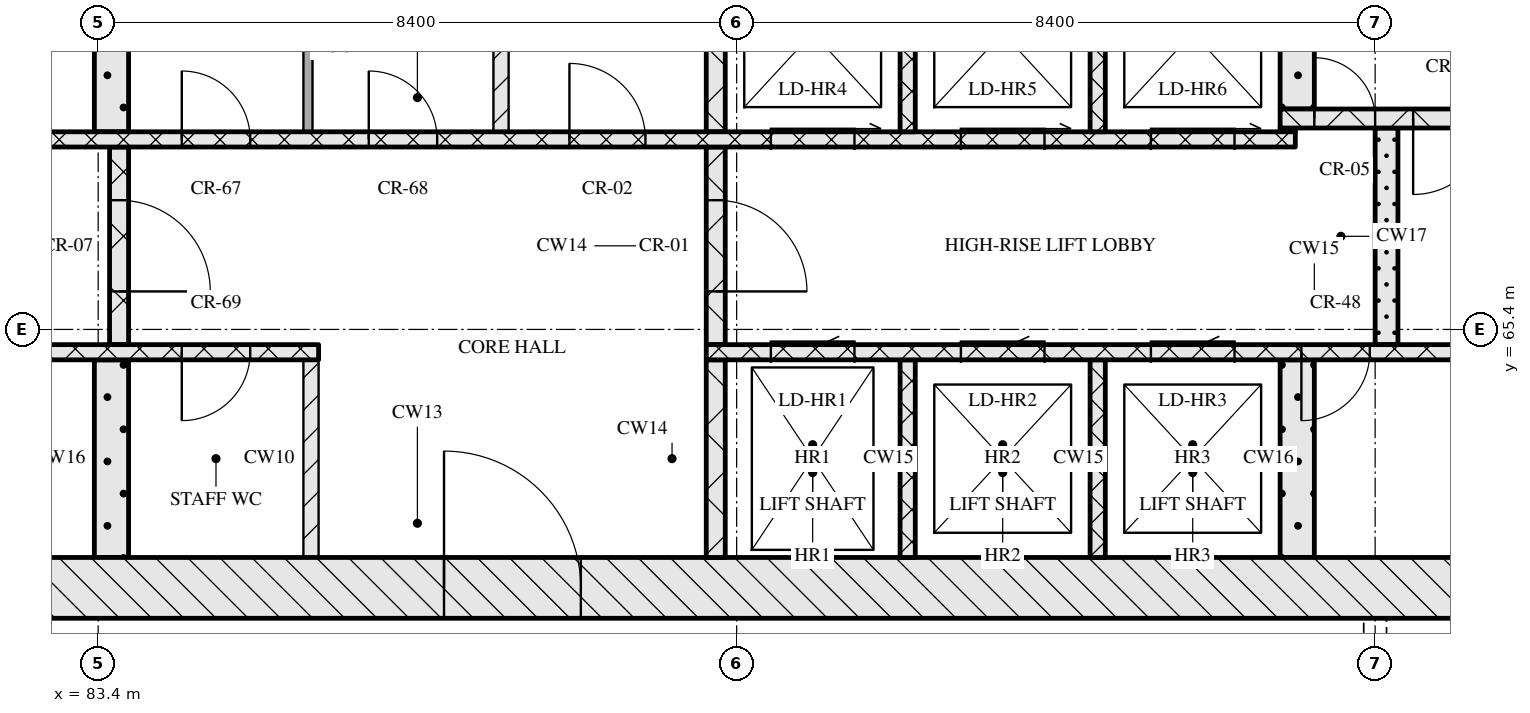
"""IFC4 building model, lengths in metres.
Left out: names, types, materials, properties, quantities, classifications, styles, units other than length and angle.
Written with IfcOpenShell. Run it as: python <this file> out.ifc"""

import sys

from ifc_helpers import new_model, si_unit, direction, frame, frame_2d, origin, place, context, subcontext, project, spatial, rectangle, extrude, element, fill, save


model = new_model("IFC4")
c1 = context("Model", 3, precision=1e-05, world=origin(), true_north=direction((0.0, 1.0)))
c2 = subcontext(c1, "Body", "Model", "MODEL_VIEW")
j1 = project(units=[si_unit("LENGTHUNIT", "METRE"), si_unit("PLANEANGLEUNIT", "RADIAN")], contexts=[c1])
p1 = place(None, origin())
s1 = spatial("IfcSite", under=j1, at=p1, CompositionType="ELEMENT")
p2 = place(p1, origin())
s2 = spatial("IfcBuilding", under=s1, at=p2, CompositionType="ELEMENT")
p3 = place(p2, frame((0.0, 0.0, 176.25)))
s3 = spatial("IfcBuildingStorey", under=s2, at=p3, CompositionType="ELEMENT", Elevation=176.25)
p4 = place(p3, frame((67.0, 62.0, 0.0), z_axis=(0.0, 0.0, 1.0), x_axis=(1.0, 0.0, 0.0)))
e1 = element("IfcWall", 1, at=p4, inside=s3, PredefinedType="SOLIDWALL", context=c2, shape_type="SweptSolid", body=[
    extrude(rectangle(XDim=41.2, YDim=0.8, at=frame_2d((20.6, 0.0))), origin(), (0.0, 0.0, 1.0), 3.32),
])
p5 = place(p4, frame((20.95, 0.0, 0.0)))
e2 = element("IfcOpeningElement", 2, at=p5, cuts=e1, PredefinedType="OPENING", context=c2, shape_type="SweptSolid", body=[
    extrude(rectangle(XDim=1.8, YDim=2.1, at=frame_2d((0.9, 1.05))), frame((0.0, 0.41, 0.0), z_axis=(0.0, -1.0, 0.0), x_axis=(1.0, 0.0, 0.0)), (0.0, 0.0, 1.0), 0.82),
])
p6 = place(p3, frame((83.575, 62.4, 0.0), z_axis=(0.0, 0.0, 1.0), x_axis=(0.0, 1.0, 0.0)))
e3 = element("IfcWall", 3, at=p6, inside=s3, PredefinedType="SOLIDWALL", context=c2, shape_type="SweptSolid", body=[
    extrude(rectangle(XDim=2.6, YDim=0.45, at=frame_2d((1.3, 0.0))), origin(), (0.0, 0.0, 1.0), 3.32),
])
p7 = place(p3, frame((86.2, 62.4, 0.0), z_axis=(0.0, 0.0, 1.0), x_axis=(0.0, 1.0, 0.0)))
e4 = element("IfcWall", 4, at=p7, inside=s3, PredefinedType="PARTITIONING", context=c2, shape_type="SweptSolid", body=[
    extrude(rectangle(XDim=2.6, YDim=0.2, at=frame_2d((1.3, 0.0))), origin(), (0.0, 0.0, 1.0), 3.32),
])
p8 = place(p3, frame((91.525, 62.4, 0.0), z_axis=(0.0, 0.0, 1.0), x_axis=(0.0, 1.0, 0.0)))
e5 = element("IfcWall", 5, at=p8, inside=s3, PredefinedType="SOLIDWALL", context=c2, shape_type="SweptSolid", body=[
    extrude(rectangle(XDim=2.6, YDim=0.25, at=frame_2d((1.3, 0.0))), origin(), (0.0, 0.0, 1.0), 3.32),
])
for number, where, z_axis, x_axis in (
    (6, (94.05, 62.4, 0.0), (0.0, 0.0, 1.0), (0.0, 1.0, 0.0)),
    (7, (96.55, 62.4, 0.0), (0.0, 0.0, 1.0), (0.0, 1.0, 0.0)),
):
    element("IfcWall", number, at=place(p3, frame(where, z_axis=z_axis, x_axis=x_axis)), inside=s3, PredefinedType="SOLIDWALL", context=c2, shape_type="SweptSolid", body=[
        extrude(rectangle(XDim=2.6, YDim=0.2, at=frame_2d((1.3, 0.0))), origin(), (0.0, 0.0, 1.0), 3.32),
    ])
p9 = place(p3, frame((99.175, 62.4, 0.0), z_axis=(0.0, 0.0, 1.0), x_axis=(0.0, 1.0, 0.0)))
e8 = element("IfcWall", 8, at=p9, inside=s3, PredefinedType="SOLIDWALL", context=c2, shape_type="SweptSolid", body=[
    extrude(rectangle(XDim=2.6, YDim=0.45, at=frame_2d((1.3, 0.0))), origin(), (0.0, 0.0, 1.0), 3.32),
])
p10 = place(p3, frame((67.8, 65.1, 0.0), z_axis=(0.0, 0.0, 1.0), x_axis=(1.0, 0.0, 0.0)))
e9 = element("IfcWall", 9, at=p10, inside=s3, PredefinedType="SOLIDWALL", context=c2, shape_type="SweptSolid", body=[
    extrude(rectangle(XDim=18.5, YDim=0.2, at=frame_2d((9.25, 0.0))), origin(), (0.0, 0.0, 1.0), 3.32),
])
p11 = place(p10, frame((7.27, 0.0, 0.0)))
e10 = element("IfcOpeningElement", 10, at=p11, cuts=e9, PredefinedType="OPENING", context=c2, shape_type="SweptSolid", body=[
    extrude(rectangle(XDim=0.9, YDim=2.1, at=frame_2d((0.45, 1.05))), frame((0.0, 0.11, 0.0), z_axis=(0.0, -1.0, 0.0), x_axis=(1.0, 0.0, 0.0)), (0.0, 0.0, 1.0), 0.22),
])
p12 = place(p10, frame((9.05, 0.0, 0.0)))
e11 = element("IfcOpeningElement", 11, at=p12, cuts=e9, PredefinedType="OPENING", context=c2, shape_type="SweptSolid", body=[
    extrude(rectangle(XDim=0.9, YDim=2.1, at=frame_2d((0.45, 1.05))), frame((0.0, 0.11, 0.0), z_axis=(0.0, -1.0, 0.0), x_axis=(1.0, 0.0, 0.0)), (0.0, 0.0, 1.0), 0.22),
])
p13 = place(p10, frame((12.76, 0.0, 0.0)))
e12 = element("IfcOpeningElement", 12, at=p13, cuts=e9, PredefinedType="OPENING", context=c2, shape_type="SweptSolid", body=[
    extrude(rectangle(XDim=0.9, YDim=2.1, at=frame_2d((0.45, 1.05))), frame((0.0, 0.11, 0.0), z_axis=(0.0, -1.0, 0.0), x_axis=(1.0, 0.0, 0.0)), (0.0, 0.0, 1.0), 0.22),
])
p14 = place(p10, frame((16.7, 0.0, 0.0)))
e13 = element("IfcOpeningElement", 13, at=p14, cuts=e9, PredefinedType="OPENING", context=c2, shape_type="SweptSolid", body=[
    extrude(rectangle(XDim=0.9, YDim=2.1, at=frame_2d((0.45, 1.05))), frame((0.0, 0.11, 0.0), z_axis=(0.0, -1.0, 0.0), x_axis=(1.0, 0.0, 0.0)), (0.0, 0.0, 1.0), 0.22),
])
p15 = place(p3, frame((91.4, 65.1, 0.0), z_axis=(0.0, 0.0, 1.0), x_axis=(1.0, 0.0, 0.0)))
e14 = element("IfcWall", 14, at=p15, inside=s3, PredefinedType="SOLIDWALL", context=c2, shape_type="SweptSolid", body=[
    extrude(rectangle(XDim=16.0, YDim=0.2, at=frame_2d((8.0, 0.0))), origin(), (0.0, 0.0, 1.0), 3.32),
])
p16 = place(p15, frame((0.85, 0.0, 0.0)))
e15 = element("IfcOpeningElement", 15, at=p16, cuts=e14, PredefinedType="OPENING", context=c2, shape_type="SweptSolid", body=[
    extrude(rectangle(XDim=1.1, YDim=2.1, at=frame_2d((0.55, 1.05))), frame((0.0, 0.11, 0.0), z_axis=(0.0, -1.0, 0.0), x_axis=(1.0, 0.0, 0.0)), (0.0, 0.0, 1.0), 0.22),
])
p17 = place(p15, frame((3.35, 0.0, 0.0)))
e16 = element("IfcOpeningElement", 16, at=p17, cuts=e14, PredefinedType="OPENING", context=c2, shape_type="SweptSolid", body=[
    extrude(rectangle(XDim=1.1, YDim=2.1, at=frame_2d((0.55, 1.05))), frame((0.0, 0.11, 0.0), z_axis=(0.0, -1.0, 0.0), x_axis=(1.0, 0.0, 0.0)), (0.0, 0.0, 1.0), 0.22),
])
p18 = place(p15, frame((5.85, 0.0, 0.0)))
e17 = element("IfcOpeningElement", 17, at=p18, cuts=e14, PredefinedType="OPENING", context=c2, shape_type="SweptSolid", body=[
    extrude(rectangle(XDim=1.1, YDim=2.1, at=frame_2d((0.55, 1.05))), frame((0.0, 0.11, 0.0), z_axis=(0.0, -1.0, 0.0), x_axis=(1.0, 0.0, 0.0)), (0.0, 0.0, 1.0), 0.22),
])
p19 = place(p15, frame((7.83, 0.0, 0.0)))
e18 = element("IfcOpeningElement", 18, at=p19, cuts=e14, PredefinedType="OPENING", context=c2, shape_type="SweptSolid", body=[
    extrude(rectangle(XDim=0.9, YDim=2.1, at=frame_2d((0.45, 1.05))), frame((0.0, 0.11, 0.0), z_axis=(0.0, -1.0, 0.0), x_axis=(1.0, 0.0, 0.0)), (0.0, 0.0, 1.0), 0.22),
])
p20 = place(p3, frame((83.675, 65.2, 0.0), z_axis=(0.0, 0.0, 1.0), x_axis=(0.0, 1.0, 0.0)))
e19 = element("IfcWall", 19, at=p20, inside=s3, PredefinedType="SOLIDWALL", context=c2, shape_type="SweptSolid", body=[
    extrude(rectangle(XDim=2.6, YDim=0.25, at=frame_2d((1.3, 0.0))), origin(), (0.0, 0.0, 1.0), 3.32),
])
p21 = place(p20, frame((0.7, 0.0, 0.0)))
e20 = element("IfcOpeningElement", 20, at=p21, cuts=e19, PredefinedType="OPENING", context=c2, shape_type="SweptSolid", body=[
    extrude(rectangle(XDim=1.2, YDim=2.1, at=frame_2d((0.6, 1.05))), frame((0.0, 0.135, 0.0), z_axis=(0.0, -1.0, 0.0), x_axis=(1.0, 0.0, 0.0)), (0.0, 0.0, 1.0), 0.27),
])
p22 = place(p3, frame((91.525, 65.2, 0.0), z_axis=(0.0, 0.0, 1.0), x_axis=(0.0, 1.0, 0.0)))
e21 = element("IfcWall", 21, at=p22, inside=s3, PredefinedType="SOLIDWALL", context=c2, shape_type="SweptSolid", body=[
    extrude(rectangle(XDim=2.6, YDim=0.25, at=frame_2d((1.3, 0.0))), origin(), (0.0, 0.0, 1.0), 3.32),
])
p23 = place(p22, frame((0.7, 0.0, 0.0)))
e22 = element("IfcOpeningElement", 22, at=p23, cuts=e21, PredefinedType="OPENING", context=c2, shape_type="SweptSolid", body=[
    extrude(rectangle(XDim=1.2, YDim=2.1, at=frame_2d((0.6, 1.05))), frame((0.0, 0.135, 0.0), z_axis=(0.0, -1.0, 0.0), x_axis=(1.0, 0.0, 0.0)), (0.0, 0.0, 1.0), 0.27),
])
p24 = place(p3, frame((100.35, 65.2, 0.0), z_axis=(0.0, 0.0, 1.0), x_axis=(0.0, 1.0, 0.0)))
e23 = element("IfcWall", 23, at=p24, inside=s3, PredefinedType="SOLIDWALL", context=c2, shape_type="SweptSolid", body=[
    extrude(rectangle(XDim=2.85, YDim=0.3, at=frame_2d((1.425, 0.0))), origin(), (0.0, 0.0, 1.0), 3.32),
])
p25 = place(p3, frame((76.05, 67.9, 0.0), z_axis=(0.0, 0.0, 1.0), x_axis=(1.0, 0.0, 0.0)))
e24 = element("IfcWall", 24, at=p25, inside=s3, PredefinedType="SOLIDWALL", context=c2, shape_type="SweptSolid", body=[
    extrude(rectangle(XDim=23.1, YDim=0.2, at=frame_2d((11.55, 0.0))), origin(), (0.0, 0.0, 1.0), 3.32),
])
p26 = place(p25, frame((1.35, 0.0, 0.0)))
e25 = element("IfcOpeningElement", 25, at=p26, cuts=e24, PredefinedType="OPENING", context=c2, shape_type="SweptSolid", body=[
    extrude(rectangle(XDim=0.9, YDim=2.1, at=frame_2d((0.45, 1.05))), frame((0.0, 0.11, 0.0), z_axis=(0.0, -1.0, 0.0), x_axis=(1.0, 0.0, 0.0)), (0.0, 0.0, 1.0), 0.22),
])
p27 = place(p25, frame((5.06, 0.0, 0.0)))
e26 = element("IfcOpeningElement", 26, at=p27, cuts=e24, PredefinedType="OPENING", context=c2, shape_type="SweptSolid", body=[
    extrude(rectangle(XDim=0.9, YDim=2.1, at=frame_2d((0.45, 1.05))), frame((0.0, 0.11, 0.0), z_axis=(0.0, -1.0, 0.0), x_axis=(1.0, 0.0, 0.0)), (0.0, 0.0, 1.0), 0.22),
])
p28 = place(p25, frame((8.45, 0.0, 0.0)))
e27 = element("IfcOpeningElement", 27, at=p28, cuts=e24, PredefinedType="OPENING", context=c2, shape_type="SweptSolid", body=[
    extrude(rectangle(XDim=0.9, YDim=2.1, at=frame_2d((0.45, 1.05))), frame((0.0, 0.11, 0.0), z_axis=(0.0, -1.0, 0.0), x_axis=(1.0, 0.0, 0.0)), (0.0, 0.0, 1.0), 0.22),
])
p29 = place(p25, frame((10.91, 0.0, 0.0)))
e28 = element("IfcOpeningElement", 28, at=p29, cuts=e24, PredefinedType="OPENING", context=c2, shape_type="SweptSolid", body=[
    extrude(rectangle(XDim=0.9, YDim=2.1, at=frame_2d((0.45, 1.05))), frame((0.0, 0.11, 0.0), z_axis=(0.0, -1.0, 0.0), x_axis=(1.0, 0.0, 0.0)), (0.0, 0.0, 1.0), 0.22),
])
p30 = place(p25, frame((13.55, 0.0, 0.0)))
e29 = element("IfcOpeningElement", 29, at=p30, cuts=e24, PredefinedType="OPENING", context=c2, shape_type="SweptSolid", body=[
    extrude(rectangle(XDim=1.0, YDim=2.1, at=frame_2d((0.5, 1.05))), frame((0.0, 0.11, 0.0), z_axis=(0.0, -1.0, 0.0), x_axis=(1.0, 0.0, 0.0)), (0.0, 0.0, 1.0), 0.22),
])
p31 = place(p25, frame((16.2, 0.0, 0.0)))
e30 = element("IfcOpeningElement", 30, at=p31, cuts=e24, PredefinedType="OPENING", context=c2, shape_type="SweptSolid", body=[
    extrude(rectangle(XDim=1.1, YDim=2.1, at=frame_2d((0.55, 1.05))), frame((0.0, 0.11, 0.0), z_axis=(0.0, -1.0, 0.0), x_axis=(1.0, 0.0, 0.0)), (0.0, 0.0, 1.0), 0.22),
])
p32 = place(p25, frame((18.7, 0.0, 0.0)))
e31 = element("IfcOpeningElement", 31, at=p32, cuts=e24, PredefinedType="OPENING", context=c2, shape_type="SweptSolid", body=[
    extrude(rectangle(XDim=1.1, YDim=2.1, at=frame_2d((0.55, 1.05))), frame((0.0, 0.11, 0.0), z_axis=(0.0, -1.0, 0.0), x_axis=(1.0, 0.0, 0.0)), (0.0, 0.0, 1.0), 0.22),
])
p33 = place(p25, frame((21.2, 0.0, 0.0)))
e32 = element("IfcOpeningElement", 32, at=p33, cuts=e24, PredefinedType="OPENING", context=c2, shape_type="SweptSolid", body=[
    extrude(rectangle(XDim=1.1, YDim=2.1, at=frame_2d((0.55, 1.05))), frame((0.0, 0.11, 0.0), z_axis=(0.0, -1.0, 0.0), x_axis=(1.0, 0.0, 0.0)), (0.0, 0.0, 1.0), 0.22),
])
p34 = place(p3, frame((83.575, 68.0, 0.0), z_axis=(0.0, 0.0, 1.0), x_axis=(0.0, 1.0, 0.0)))
e33 = element("IfcWall", 33, at=p34, inside=s3, PredefinedType="SOLIDWALL", context=c2, shape_type="SweptSolid", body=[
    extrude(rectangle(XDim=2.6, YDim=0.45, at=frame_2d((1.3, 0.0))), origin(), (0.0, 0.0, 1.0), 3.32),
])
p35 = place(p3, frame((86.16, 68.0, 0.0), z_axis=(0.0, 0.0, 1.0), x_axis=(0.0, 1.0, 0.0)))
e34 = element("IfcWall", 34, at=p35, inside=s3, PredefinedType="PARTITIONING", context=c2, shape_type="SweptSolid", body=[
    extrude(rectangle(XDim=2.6, YDim=0.12, at=frame_2d((1.3, 0.0))), origin(), (0.0, 0.0, 1.0), 3.32),
])
p36 = place(p3, frame((88.7, 68.0, 0.0), z_axis=(0.0, 0.0, 1.0), x_axis=(0.0, 1.0, 0.0)))
e35 = element("IfcWall", 35, at=p36, inside=s3, PredefinedType="PARTITIONING", context=c2, shape_type="SweptSolid", body=[
    extrude(rectangle(XDim=2.6, YDim=0.2, at=frame_2d((1.3, 0.0))), origin(), (0.0, 0.0, 1.0), 3.32),
])
p37 = place(p3, frame((91.525, 68.0, 0.0), z_axis=(0.0, 0.0, 1.0), x_axis=(0.0, 1.0, 0.0)))
e36 = element("IfcWall", 36, at=p37, inside=s3, PredefinedType="SOLIDWALL", context=c2, shape_type="SweptSolid", body=[
    extrude(rectangle(XDim=2.6, YDim=0.25, at=frame_2d((1.3, 0.0))), origin(), (0.0, 0.0, 1.0), 3.32),
])
for number, where, z_axis, x_axis in (
    (37, (94.05, 68.0, 0.0), (0.0, 0.0, 1.0), (0.0, 1.0, 0.0)),
    (38, (96.55, 68.0, 0.0), (0.0, 0.0, 1.0), (0.0, 1.0, 0.0)),
):
    element("IfcWall", number, at=place(p3, frame(where, z_axis=z_axis, x_axis=x_axis)), inside=s3, PredefinedType="SOLIDWALL", context=c2, shape_type="SweptSolid", body=[
        extrude(rectangle(XDim=2.6, YDim=0.2, at=frame_2d((1.3, 0.0))), origin(), (0.0, 0.0, 1.0), 3.32),
    ])
p38 = place(p3, frame((98.95, 68.025, 0.0), z_axis=(0.0, 0.0, 1.0), x_axis=(1.0, 0.0, 0.0)))
e39 = element("IfcWall", 39, at=p38, inside=s3, PredefinedType="SOLIDWALL", context=c2, shape_type="SweptSolid", body=[
    extrude(rectangle(XDim=0.2, YDim=0.05, at=frame_2d((0.1, 0.0))), origin(), (0.0, 0.0, 1.0), 3.32),
])
p39 = place(p3, frame((98.95, 68.175, 0.0), z_axis=(0.0, 0.0, 1.0), x_axis=(1.0, 0.0, 0.0)))
e40 = element("IfcWall", 40, at=p39, inside=s3, PredefinedType="SOLIDWALL", context=c2, shape_type="SweptSolid", body=[
    extrude(rectangle(XDim=8.45, YDim=0.25, at=frame_2d((4.225, 0.0))), origin(), (0.0, 0.0, 1.0), 3.32),
])
p40 = place(p39, frame((0.45, 0.0, 0.0)))
e41 = element("IfcOpeningElement", 41, at=p40, cuts=e40, PredefinedType="OPENING", context=c2, shape_type="SweptSolid", body=[
    extrude(rectangle(XDim=0.8, YDim=2.1, at=frame_2d((0.4, 1.05))), frame((0.0, 0.135, 0.0), z_axis=(0.0, -1.0, 0.0), x_axis=(1.0, 0.0, 0.0)), (0.0, 0.0, 1.0), 0.27),
])
p41 = place(p39, frame((1.75, 0.0, 0.0)))
e42 = element("IfcOpeningElement", 42, at=p41, cuts=e40, PredefinedType="OPENING", context=c2, shape_type="SweptSolid", body=[
    extrude(rectangle(XDim=1.0, YDim=2.1, at=frame_2d((0.5, 1.05))), frame((0.0, 0.135, 0.0), z_axis=(0.0, -1.0, 0.0), x_axis=(1.0, 0.0, 0.0)), (0.0, 0.0, 1.0), 0.27),
])
p42 = place(p3, frame((99.175, 68.3, 0.0), z_axis=(0.0, 0.0, 1.0), x_axis=(0.0, 1.0, 0.0)))
e43 = element("IfcWall", 43, at=p42, inside=s3, PredefinedType="SOLIDWALL", context=c2, shape_type="SweptSolid", body=[
    extrude(rectangle(XDim=2.3, YDim=0.45, at=frame_2d((1.15, 0.0))), origin(), (0.0, 0.0, 1.0), 3.32),
])
p43 = place(p5, origin())
e44 = element("IfcDoor", 44, at=p43, inside=s3, OperationType="DOUBLE_DOOR_SINGLE_SWING", PredefinedType="DOOR", context=c2, shape_type="SweptSolid", body=[
    extrude(rectangle(XDim=1.8, YDim=2.1, at=frame_2d((0.9, 1.05))), frame((0.0, 0.025, 0.0), z_axis=(0.0, -1.0, 0.0), x_axis=(1.0, 0.0, 0.0)), (0.0, 0.0, 1.0), 0.05),
])
fill(e2, e44)
p44 = place(p14, origin())
e45 = element("IfcDoor", 45, at=p44, inside=s3, OperationType="SINGLE_SWING_RIGHT", PredefinedType="DOOR", context=c2, shape_type="SweptSolid", body=[
    extrude(rectangle(XDim=0.9, YDim=2.1, at=frame_2d((0.45, 1.05))), frame((0.0, 0.025, 0.0), z_axis=(0.0, -1.0, 0.0), x_axis=(1.0, 0.0, 0.0)), (0.0, 0.0, 1.0), 0.05),
])
fill(e13, e45)
p45 = place(p16, origin())
e46 = element("IfcDoor", 46, at=p45, inside=s3, OperationType="SLIDING_TO_LEFT", PredefinedType="DOOR", context=c2, shape_type="SweptSolid", body=[
    extrude(rectangle(XDim=1.1, YDim=2.1, at=frame_2d((0.55, 1.05))), frame((0.0, 0.025, 0.0), z_axis=(0.0, -1.0, 0.0), x_axis=(1.0, 0.0, 0.0)), (0.0, 0.0, 1.0), 0.05),
])
fill(e15, e46)
p46 = place(p17, origin())
e47 = element("IfcDoor", 47, at=p46, inside=s3, OperationType="SLIDING_TO_LEFT", PredefinedType="DOOR", context=c2, shape_type="SweptSolid", body=[
    extrude(rectangle(XDim=1.1, YDim=2.1, at=frame_2d((0.55, 1.05))), frame((0.0, 0.025, 0.0), z_axis=(0.0, -1.0, 0.0), x_axis=(1.0, 0.0, 0.0)), (0.0, 0.0, 1.0), 0.05),
])
fill(e16, e47)
p47 = place(p18, origin())
e48 = element("IfcDoor", 48, at=p47, inside=s3, OperationType="SLIDING_TO_LEFT", PredefinedType="DOOR", context=c2, shape_type="SweptSolid", body=[
    extrude(rectangle(XDim=1.1, YDim=2.1, at=frame_2d((0.55, 1.05))), frame((0.0, 0.025, 0.0), z_axis=(0.0, -1.0, 0.0), x_axis=(1.0, 0.0, 0.0)), (0.0, 0.0, 1.0), 0.05),
])
fill(e17, e48)
p48 = place(p19, origin())
e49 = element("IfcDoor", 49, at=p48, inside=s3, OperationType="SINGLE_SWING_RIGHT", PredefinedType="DOOR", context=c2, shape_type="SweptSolid", body=[
    extrude(rectangle(XDim=0.9, YDim=2.1, at=frame_2d((0.45, 1.05))), frame((0.0, 0.025, 0.0), z_axis=(0.0, -1.0, 0.0), x_axis=(1.0, 0.0, 0.0)), (0.0, 0.0, 1.0), 0.05),
])
fill(e18, e49)
p49 = place(p21, origin())
e50 = element("IfcDoor", 50, at=p49, inside=s3, OperationType="SINGLE_SWING_RIGHT", PredefinedType="DOOR", context=c2, shape_type="SweptSolid", body=[
    extrude(rectangle(XDim=1.2, YDim=2.1, at=frame_2d((0.6, 1.05))), frame((0.0, 0.025, 0.0), z_axis=(0.0, -1.0, 0.0), x_axis=(1.0, 0.0, 0.0)), (0.0, 0.0, 1.0), 0.05),
])
fill(e20, e50)
p50 = place(p23, origin())
e51 = element("IfcDoor", 51, at=p50, inside=s3, OperationType="SINGLE_SWING_RIGHT", PredefinedType="DOOR", context=c2, shape_type="SweptSolid", body=[
    extrude(rectangle(XDim=1.2, YDim=2.1, at=frame_2d((0.6, 1.05))), frame((0.0, 0.025, 0.0), z_axis=(0.0, -1.0, 0.0), x_axis=(1.0, 0.0, 0.0)), (0.0, 0.0, 1.0), 0.05),
])
fill(e22, e51)
p51 = place(p28, origin())
e52 = element("IfcDoor", 52, at=p51, inside=s3, OperationType="SINGLE_SWING_LEFT", PredefinedType="DOOR", context=c2, shape_type="SweptSolid", body=[
    extrude(rectangle(XDim=0.9, YDim=2.1, at=frame_2d((0.45, 1.05))), frame((0.0, 0.025, 0.0), z_axis=(0.0, -1.0, 0.0), x_axis=(1.0, 0.0, 0.0)), (0.0, 0.0, 1.0), 0.05),
])
fill(e27, e52)
p52 = place(p29, origin())
e53 = element("IfcDoor", 53, at=p52, inside=s3, OperationType="SINGLE_SWING_LEFT", PredefinedType="DOOR", context=c2, shape_type="SweptSolid", body=[
    extrude(rectangle(XDim=0.9, YDim=2.1, at=frame_2d((0.45, 1.05))), frame((0.0, 0.025, 0.0), z_axis=(0.0, -1.0, 0.0), x_axis=(1.0, 0.0, 0.0)), (0.0, 0.0, 1.0), 0.05),
])
fill(e28, e53)
p53 = place(p30, origin())
e54 = element("IfcDoor", 54, at=p53, inside=s3, OperationType="SINGLE_SWING_LEFT", PredefinedType="DOOR", context=c2, shape_type="SweptSolid", body=[
    extrude(rectangle(XDim=1.0, YDim=2.1, at=frame_2d((0.5, 1.05))), frame((0.0, 0.025, 0.0), z_axis=(0.0, -1.0, 0.0), x_axis=(1.0, 0.0, 0.0)), (0.0, 0.0, 1.0), 0.05),
])
fill(e29, e54)
p54 = place(p31, origin())
e55 = element("IfcDoor", 55, at=p54, inside=s3, OperationType="SLIDING_TO_RIGHT", PredefinedType="DOOR", context=c2, shape_type="SweptSolid", body=[
    extrude(rectangle(XDim=1.1, YDim=2.1, at=frame_2d((0.55, 1.05))), frame((0.0, 0.025, 0.0), z_axis=(0.0, -1.0, 0.0), x_axis=(1.0, 0.0, 0.0)), (0.0, 0.0, 1.0), 0.05),
])
fill(e30, e55)
p55 = place(p32, origin())
e56 = element("IfcDoor", 56, at=p55, inside=s3, OperationType="SLIDING_TO_RIGHT", PredefinedType="DOOR", context=c2, shape_type="SweptSolid", body=[
    extrude(rectangle(XDim=1.1, YDim=2.1, at=frame_2d((0.55, 1.05))), frame((0.0, 0.025, 0.0), z_axis=(0.0, -1.0, 0.0), x_axis=(1.0, 0.0, 0.0)), (0.0, 0.0, 1.0), 0.05),
])
fill(e31, e56)
p56 = place(p33, origin())
e57 = element("IfcDoor", 57, at=p56, inside=s3, OperationType="SLIDING_TO_RIGHT", PredefinedType="DOOR", context=c2, shape_type="SweptSolid", body=[
    extrude(rectangle(XDim=1.1, YDim=2.1, at=frame_2d((0.55, 1.05))), frame((0.0, 0.025, 0.0), z_axis=(0.0, -1.0, 0.0), x_axis=(1.0, 0.0, 0.0)), (0.0, 0.0, 1.0), 0.05),
])
fill(e32, e57)
p57 = place(p40, origin())
e58 = element("IfcDoor", 58, at=p57, inside=s3, OperationType="SINGLE_SWING_LEFT", PredefinedType="DOOR", context=c2, shape_type="SweptSolid", body=[
    extrude(rectangle(XDim=0.8, YDim=2.1, at=frame_2d((0.4, 1.05))), frame((0.0, 0.025, 0.0), z_axis=(0.0, -1.0, 0.0), x_axis=(1.0, 0.0, 0.0)), (0.0, 0.0, 1.0), 0.05),
])
fill(e41, e58)
p58 = place(p41, origin())
e59 = element("IfcDoor", 59, at=p58, inside=s3, OperationType="SINGLE_SWING_RIGHT", PredefinedType="DOOR", context=c2, shape_type="SweptSolid", body=[
    extrude(rectangle(XDim=1.0, YDim=2.1, at=frame_2d((0.5, 1.05))), frame((0.0, 0.025, 0.0), z_axis=(0.0, -1.0, 0.0), x_axis=(1.0, 0.0, 0.0)), (0.0, 0.0, 1.0), 0.05),
])
fill(e42, e59)
save(model, sys.argv[1])
